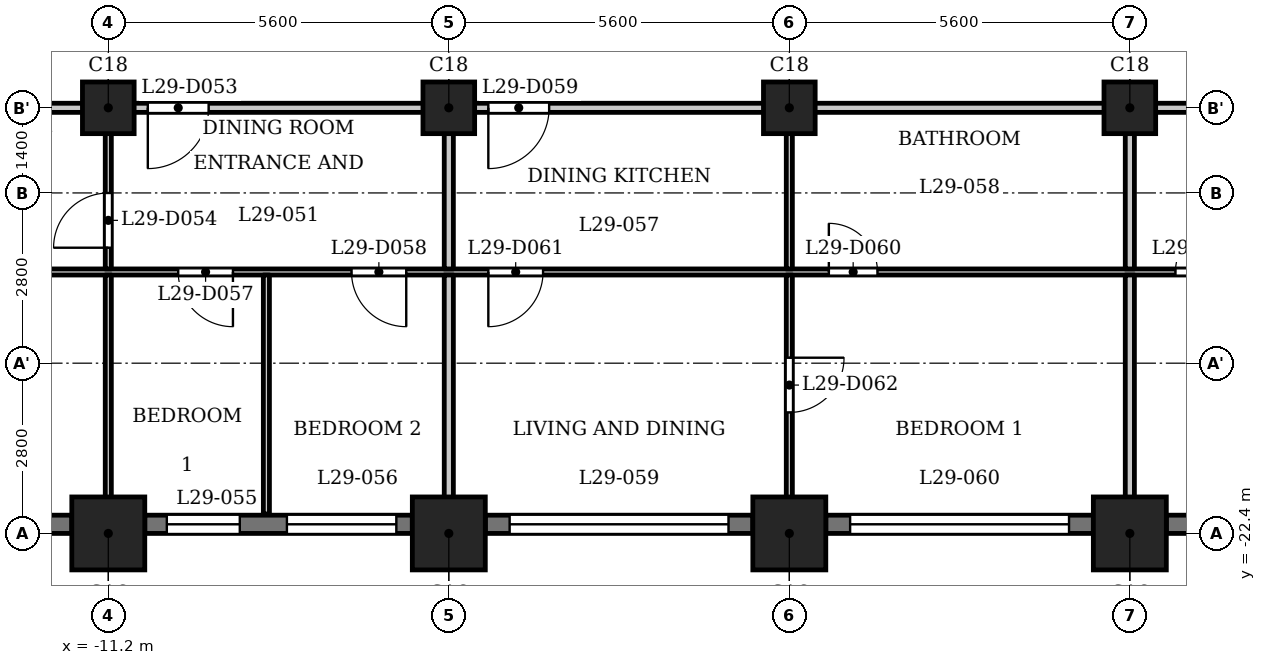
"""IFC4 building model, lengths in metres.
Left out: names, types, materials, properties, quantities, classifications, styles, units other than length and angle.
Written with IfcOpenShell. Run it as: python <this file> out.ifc"""

import sys

from ifc_helpers import new_model, si_unit, direction, frame, frame_2d, origin, origin_2d, place, context, subcontext, project, spatial, rectangle, extrude, element, fill, save


model = new_model("IFC4")
c1 = context("Model", 3, precision=1e-05, world=origin(), true_north=direction((0.0, 1.0)))
c2 = subcontext(c1, "Body", "Model", "MODEL_VIEW")
j1 = project(units=[si_unit("LENGTHUNIT", "METRE"), si_unit("PLANEANGLEUNIT", "RADIAN")], contexts=[c1])
p1 = place(None, origin())
s1 = spatial("IfcSite", under=j1, at=p1, CompositionType="ELEMENT")
p2 = place(p1, origin())
s2 = spatial("IfcBuilding", under=s1, at=p2, CompositionType="ELEMENT")
p3 = place(p2, frame((0.0, 0.0, 114.8)))
s3 = spatial("IfcBuildingStorey", under=s2, at=p3, CompositionType="ELEMENT", Elevation=114.8)
for number, where, z_axis, x_axis in (
    (1, (-11.2, -22.4, 0.0), (0.0, 0.0, 1.0), (1.0, 0.0, 0.0)),
    (2, (-5.6, -22.4, 0.0), (0.0, 0.0, 1.0), (1.0, 0.0, 0.0)),
    (3, (0.0, -22.4, 0.0), (0.0, 0.0, 1.0), (1.0, 0.0, 0.0)),
    (4, (5.6, -22.4, 0.0), (0.0, 0.0, 1.0), (1.0, 0.0, 0.0)),
):
    element("IfcColumn", number, at=place(p3, frame(where, z_axis=z_axis, x_axis=x_axis)), inside=s3, PredefinedType="COLUMN", context=c2, shape_type="SweptSolid", body=[
        extrude(rectangle(XDim=1.2, YDim=1.2, at=origin_2d()), origin(), (0.0, 0.0, 1.0), 3.5),
    ])
for number, where, z_axis, x_axis in (
    (5, (-11.2, -15.4, 0.0), (0.0, 0.0, 1.0), (1.0, 0.0, 0.0)),
    (6, (-5.6, -15.4, 0.0), (0.0, 0.0, 1.0), (1.0, 0.0, 0.0)),
    (7, (0.0, -15.4, 0.0), (0.0, 0.0, 1.0), (1.0, 0.0, 0.0)),
    (8, (5.6, -15.4, 0.0), (0.0, 0.0, 1.0), (1.0, 0.0, 0.0)),
):
    element("IfcColumn", number, at=place(p3, frame(where, z_axis=z_axis, x_axis=x_axis)), inside=s3, PredefinedType="COLUMN", context=c2, shape_type="SweptSolid", body=[
        extrude(rectangle(XDim=0.85, YDim=0.85, at=origin_2d()), origin(), (0.0, 0.0, 1.0), 3.5),
    ])
p4 = place(p3, frame((-16.2, -22.25, 0.0), z_axis=(0.0, 0.0, 1.0), x_axis=(1.0, 0.0, 0.0)))
e9 = element("IfcWall", 9, at=p4, inside=s3, PredefinedType="SOLIDWALL", context=c2, shape_type="SweptSolid", body=[
    extrude(rectangle(XDim=4.4, YDim=0.3, at=frame_2d((2.2, 0.0))), origin(), (0.0, 0.0, 1.0), 2.4),
])
p5 = place(p4, frame((0.4, 0.0, 1.2)))
e10 = element("IfcOpeningElement", 10, at=p5, cuts=e9, PredefinedType="OPENING", context=c2, shape_type="SweptSolid", body=[
    extrude(rectangle(XDim=3.6, YDim=0.95, at=frame_2d((1.8, 0.475))), frame((0.0, 0.16, 0.0), z_axis=(0.0, -1.0, 0.0), x_axis=(1.0, 0.0, 0.0)), (0.0, 0.0, 1.0), 0.32),
])
p6 = place(p3, frame((-10.6, -22.25, 0.0), z_axis=(0.0, 0.0, 1.0), x_axis=(1.0, 0.0, 0.0)))
e11 = element("IfcWall", 11, at=p6, inside=s3, PredefinedType="SOLIDWALL", context=c2, shape_type="SweptSolid", body=[
    extrude(rectangle(XDim=4.4, YDim=0.3, at=frame_2d((2.2, 0.0))), origin(), (0.0, 0.0, 1.0), 2.4),
])
p7 = place(p6, frame((0.363, 0.0, 0.6)))
e12 = element("IfcOpeningElement", 12, at=p7, cuts=e11, PredefinedType="OPENING", context=c2, shape_type="SweptSolid", body=[
    extrude(rectangle(XDim=1.2, YDim=1.55, at=frame_2d((0.6, 0.775))), frame((0.0, 0.16, 0.0), z_axis=(0.0, -1.0, 0.0), x_axis=(1.0, 0.0, 0.0)), (0.0, 0.0, 1.0), 0.32),
])
p8 = place(p6, frame((2.337, 0.0, 0.9)))
e13 = element("IfcOpeningElement", 13, at=p8, cuts=e11, PredefinedType="OPENING", context=c2, shape_type="SweptSolid", body=[
    extrude(rectangle(XDim=1.8, YDim=1.25, at=frame_2d((0.9, 0.625))), frame((0.0, 0.16, 0.0), z_axis=(0.0, -1.0, 0.0), x_axis=(1.0, 0.0, 0.0)), (0.0, 0.0, 1.0), 0.32),
])
p9 = place(p3, frame((-5.0, -22.25, 0.0), z_axis=(0.0, 0.0, 1.0), x_axis=(1.0, 0.0, 0.0)))
e14 = element("IfcWall", 14, at=p9, inside=s3, PredefinedType="SOLIDWALL", context=c2, shape_type="SweptSolid", body=[
    extrude(rectangle(XDim=4.4, YDim=0.3, at=frame_2d((2.2, 0.0))), origin(), (0.0, 0.0, 1.0), 2.4),
])
p10 = place(p9, frame((0.4, 0.0, 1.2)))
e15 = element("IfcOpeningElement", 15, at=p10, cuts=e14, PredefinedType="OPENING", context=c2, shape_type="SweptSolid", body=[
    extrude(rectangle(XDim=3.6, YDim=0.95, at=frame_2d((1.8, 0.475))), frame((0.0, 0.16, 0.0), z_axis=(0.0, -1.0, 0.0), x_axis=(1.0, 0.0, 0.0)), (0.0, 0.0, 1.0), 0.32),
])
p11 = place(p3, frame((0.6, -22.25, 0.0), z_axis=(0.0, 0.0, 1.0), x_axis=(1.0, 0.0, 0.0)))
e16 = element("IfcWall", 16, at=p11, inside=s3, PredefinedType="SOLIDWALL", context=c2, shape_type="SweptSolid", body=[
    extrude(rectangle(XDim=4.4, YDim=0.3, at=frame_2d((2.2, 0.0))), origin(), (0.0, 0.0, 1.0), 2.4),
])
p12 = place(p11, frame((0.4, 0.0, 1.2)))
e17 = element("IfcOpeningElement", 17, at=p12, cuts=e16, PredefinedType="OPENING", context=c2, shape_type="SweptSolid", body=[
    extrude(rectangle(XDim=3.6, YDim=0.95, at=frame_2d((1.8, 0.475))), frame((0.0, 0.16, 0.0), z_axis=(0.0, -1.0, 0.0), x_axis=(1.0, 0.0, 0.0)), (0.0, 0.0, 1.0), 0.32),
])
p13 = place(p3, frame((6.2, -22.25, 0.0), z_axis=(0.0, 0.0, 1.0), x_axis=(1.0, 0.0, 0.0)))
e18 = element("IfcWall", 18, at=p13, inside=s3, PredefinedType="SOLIDWALL", context=c2, shape_type="SweptSolid", body=[
    extrude(rectangle(XDim=4.4, YDim=0.3, at=frame_2d((2.2, 0.0))), origin(), (0.0, 0.0, 1.0), 2.4),
])
p14 = place(p13, frame((0.4, 0.0, 1.2)))
e19 = element("IfcOpeningElement", 19, at=p14, cuts=e18, PredefinedType="OPENING", context=c2, shape_type="SweptSolid", body=[
    extrude(rectangle(XDim=3.6, YDim=0.95, at=frame_2d((1.8, 0.475))), frame((0.0, 0.16, 0.0), z_axis=(0.0, -1.0, 0.0), x_axis=(1.0, 0.0, 0.0)), (0.0, 0.0, 1.0), 0.32),
])
p15 = place(p3, frame((-26.19, -18.1, 0.0), z_axis=(0.0, 0.0, 1.0), x_axis=(1.0, 0.0, 0.0)))
e20 = element("IfcWall", 20, at=p15, inside=s3, PredefinedType="PARTITIONING", context=c2, shape_type="SweptSolid", body=[
    extrude(rectangle(XDim=52.63, YDim=0.1, at=frame_2d((26.315, 0.0))), origin(), (0.0, 0.0, 1.0), 3.2),
])
p16 = place(p15, frame((1.09, 0.0, 0.0)))
e21 = element("IfcOpeningElement", 21, at=p16, cuts=e20, PredefinedType="OPENING", context=c2, shape_type="SweptSolid", body=[
    extrude(rectangle(XDim=0.8, YDim=2.1, at=frame_2d((0.4, 1.05))), frame((0.0, 0.06, 0.0), z_axis=(0.0, -1.0, 0.0), x_axis=(1.0, 0.0, 0.0)), (0.0, 0.0, 1.0), 0.12),
])
p17 = place(p15, frame((4.44, 0.0, 0.0)))
e22 = element("IfcOpeningElement", 22, at=p17, cuts=e20, PredefinedType="OPENING", context=c2, shape_type="SweptSolid", body=[
    extrude(rectangle(XDim=0.9, YDim=2.1, at=frame_2d((0.45, 1.05))), frame((0.0, 0.06, 0.0), z_axis=(0.0, -1.0, 0.0), x_axis=(1.0, 0.0, 0.0)), (0.0, 0.0, 1.0), 0.12),
])
p18 = place(p15, frame((10.14, 0.0, 0.0)))
e23 = element("IfcOpeningElement", 23, at=p18, cuts=e20, PredefinedType="OPENING", context=c2, shape_type="SweptSolid", body=[
    extrude(rectangle(XDim=0.8, YDim=2.1, at=frame_2d((0.4, 1.05))), frame((0.0, 0.06, 0.0), z_axis=(0.0, -1.0, 0.0), x_axis=(1.0, 0.0, 0.0)), (0.0, 0.0, 1.0), 0.12),
])
p19 = place(p15, frame((12.74, 0.0, 0.0)))
e24 = element("IfcOpeningElement", 24, at=p19, cuts=e20, PredefinedType="OPENING", context=c2, shape_type="SweptSolid", body=[
    extrude(rectangle(XDim=0.9, YDim=2.1, at=frame_2d((0.45, 1.05))), frame((0.0, 0.06, 0.0), z_axis=(0.0, -1.0, 0.0), x_axis=(1.0, 0.0, 0.0)), (0.0, 0.0, 1.0), 0.12),
])
p20 = place(p15, frame((16.14, 0.0, 0.0)))
e25 = element("IfcOpeningElement", 25, at=p20, cuts=e20, PredefinedType="OPENING", context=c2, shape_type="SweptSolid", body=[
    extrude(rectangle(XDim=0.9, YDim=2.1, at=frame_2d((0.45, 1.05))), frame((0.0, 0.06, 0.0), z_axis=(0.0, -1.0, 0.0), x_axis=(1.0, 0.0, 0.0)), (0.0, 0.0, 1.0), 0.12),
])
p21 = place(p15, frame((18.99, 0.0, 0.0)))
e26 = element("IfcOpeningElement", 26, at=p21, cuts=e20, PredefinedType="OPENING", context=c2, shape_type="SweptSolid", body=[
    extrude(rectangle(XDim=0.9, YDim=2.1, at=frame_2d((0.45, 1.05))), frame((0.0, 0.06, 0.0), z_axis=(0.0, -1.0, 0.0), x_axis=(1.0, 0.0, 0.0)), (0.0, 0.0, 1.0), 0.12),
])
p22 = place(p15, frame((26.84, 0.0, 0.0)))
e27 = element("IfcOpeningElement", 27, at=p22, cuts=e20, PredefinedType="OPENING", context=c2, shape_type="SweptSolid", body=[
    extrude(rectangle(XDim=0.8, YDim=2.1, at=frame_2d((0.4, 1.05))), frame((0.0, 0.06, 0.0), z_axis=(0.0, -1.0, 0.0), x_axis=(1.0, 0.0, 0.0)), (0.0, 0.0, 1.0), 0.12),
])
p23 = place(p15, frame((21.24, 0.0, 0.0)))
e28 = element("IfcOpeningElement", 28, at=p23, cuts=e20, PredefinedType="OPENING", context=c2, shape_type="SweptSolid", body=[
    extrude(rectangle(XDim=0.9, YDim=2.1, at=frame_2d((0.45, 1.05))), frame((0.0, 0.06, 0.0), z_axis=(0.0, -1.0, 0.0), x_axis=(1.0, 0.0, 0.0)), (0.0, 0.0, 1.0), 0.12),
])
p24 = place(p15, frame((32.54, 0.0, 0.0)))
e29 = element("IfcOpeningElement", 29, at=p24, cuts=e20, PredefinedType="OPENING", context=c2, shape_type="SweptSolid", body=[
    extrude(rectangle(XDim=0.8, YDim=2.1, at=frame_2d((0.4, 1.05))), frame((0.0, 0.06, 0.0), z_axis=(0.0, -1.0, 0.0), x_axis=(1.0, 0.0, 0.0)), (0.0, 0.0, 1.0), 0.12),
])
p25 = place(p15, frame((35.14, 0.0, 0.0)))
e30 = element("IfcOpeningElement", 30, at=p25, cuts=e20, PredefinedType="OPENING", context=c2, shape_type="SweptSolid", body=[
    extrude(rectangle(XDim=0.9, YDim=2.1, at=frame_2d((0.45, 1.05))), frame((0.0, 0.06, 0.0), z_axis=(0.0, -1.0, 0.0), x_axis=(1.0, 0.0, 0.0)), (0.0, 0.0, 1.0), 0.12),
])
p26 = place(p15, frame((38.54, 0.0, 0.0)))
e31 = element("IfcOpeningElement", 31, at=p26, cuts=e20, PredefinedType="OPENING", context=c2, shape_type="SweptSolid", body=[
    extrude(rectangle(XDim=0.9, YDim=2.1, at=frame_2d((0.45, 1.05))), frame((0.0, 0.06, 0.0), z_axis=(0.0, -1.0, 0.0), x_axis=(1.0, 0.0, 0.0)), (0.0, 0.0, 1.0), 0.12),
])
p27 = place(p15, frame((41.39, 0.0, 0.0)))
e32 = element("IfcOpeningElement", 32, at=p27, cuts=e20, PredefinedType="OPENING", context=c2, shape_type="SweptSolid", body=[
    extrude(rectangle(XDim=0.9, YDim=2.1, at=frame_2d((0.45, 1.05))), frame((0.0, 0.06, 0.0), z_axis=(0.0, -1.0, 0.0), x_axis=(1.0, 0.0, 0.0)), (0.0, 0.0, 1.0), 0.12),
])
p28 = place(p15, frame((49.204, 0.0, 0.0)))
e33 = element("IfcOpeningElement", 33, at=p28, cuts=e20, PredefinedType="OPENING", context=c2, shape_type="SweptSolid", body=[
    extrude(rectangle(XDim=0.8, YDim=2.1, at=frame_2d((0.4, 1.05))), frame((0.0, 0.06, 0.0), z_axis=(0.0, -1.0, 0.0), x_axis=(1.0, 0.0, 0.0)), (0.0, 0.0, 1.0), 0.12),
])
p29 = place(p15, frame((43.64, 0.0, 0.0)))
e34 = element("IfcOpeningElement", 34, at=p29, cuts=e20, PredefinedType="OPENING", context=c2, shape_type="SweptSolid", body=[
    extrude(rectangle(XDim=0.9, YDim=2.1, at=frame_2d((0.45, 1.05))), frame((0.0, 0.06, 0.0), z_axis=(0.0, -1.0, 0.0), x_axis=(1.0, 0.0, 0.0)), (0.0, 0.0, 1.0), 0.12),
])
p30 = place(p3, frame((-27.484, -15.4, 0.0), z_axis=(0.0, 0.0, 1.0), x_axis=(1.0, 0.0, 0.0)))
e35 = element("IfcWall", 35, at=p30, inside=s3, PredefinedType="PARTITIONING", context=c2, shape_type="SweptSolid", body=[
    extrude(rectangle(XDim=54.968, YDim=0.15, at=frame_2d((27.484, 0.0))), origin(), (0.0, 0.0, 1.0), 3.2),
])
p31 = place(p30, frame((5.734, 0.0, 0.0)))
e36 = element("IfcOpeningElement", 36, at=p31, cuts=e35, PredefinedType="OPENING", context=c2, shape_type="SweptSolid", body=[
    extrude(rectangle(XDim=1.0, YDim=2.1, at=frame_2d((0.5, 1.05))), frame((0.0, 0.085, 0.0), z_axis=(0.0, -1.0, 0.0), x_axis=(1.0, 0.0, 0.0)), (0.0, 0.0, 1.0), 0.17),
])
p32 = place(p30, frame((16.934, 0.0, 0.0)))
e37 = element("IfcOpeningElement", 37, at=p32, cuts=e35, PredefinedType="OPENING", context=c2, shape_type="SweptSolid", body=[
    extrude(rectangle(XDim=1.0, YDim=2.1, at=frame_2d((0.5, 1.05))), frame((0.0, 0.085, 0.0), z_axis=(0.0, -1.0, 0.0), x_axis=(1.0, 0.0, 0.0)), (0.0, 0.0, 1.0), 0.17),
])
p33 = place(p30, frame((22.534, 0.0, 0.0)))
e38 = element("IfcOpeningElement", 38, at=p33, cuts=e35, PredefinedType="OPENING", context=c2, shape_type="SweptSolid", body=[
    extrude(rectangle(XDim=1.0, YDim=2.1, at=frame_2d((0.5, 1.05))), frame((0.0, 0.085, 0.0), z_axis=(0.0, -1.0, 0.0), x_axis=(1.0, 0.0, 0.0)), (0.0, 0.0, 1.0), 0.17),
])
p34 = place(p30, frame((39.334, 0.0, 0.0)))
e39 = element("IfcOpeningElement", 39, at=p34, cuts=e35, PredefinedType="OPENING", context=c2, shape_type="SweptSolid", body=[
    extrude(rectangle(XDim=1.0, YDim=2.1, at=frame_2d((0.5, 1.05))), frame((0.0, 0.085, 0.0), z_axis=(0.0, -1.0, 0.0), x_axis=(1.0, 0.0, 0.0)), (0.0, 0.0, 1.0), 0.17),
])
p35 = place(p30, frame((44.934, 0.0, 0.0)))
e40 = element("IfcOpeningElement", 40, at=p35, cuts=e35, PredefinedType="OPENING", context=c2, shape_type="SweptSolid", body=[
    extrude(rectangle(XDim=1.0, YDim=2.1, at=frame_2d((0.5, 1.05))), frame((0.0, 0.085, 0.0), z_axis=(0.0, -1.0, 0.0), x_axis=(1.0, 0.0, 0.0)), (0.0, 0.0, 1.0), 0.17),
])
p36 = place(p3, frame((-11.2, -22.98, 0.0), z_axis=(0.0, 0.0, 1.0), x_axis=(0.0, 1.0, 0.0)))
e41 = element("IfcWall", 41, at=p36, inside=s3, PredefinedType="PARTITIONING", context=c2, shape_type="SweptSolid", body=[
    extrude(rectangle(XDim=4.83, YDim=0.1, at=frame_2d((2.415, 0.0))), origin(), (0.0, 0.0, 1.0), 3.2),
])
p37 = place(p3, frame((-11.2, -18.05, 0.0), z_axis=(0.0, 0.0, 1.0), x_axis=(0.0, 1.0, 0.0)))
e42 = element("IfcWall", 42, at=p37, inside=s3, PredefinedType="PARTITIONING", context=c2, shape_type="SweptSolid", body=[
    extrude(rectangle(XDim=2.575, YDim=0.1, at=frame_2d((1.288, 0.0))), origin(), (0.0, 0.0, 1.0), 3.2),
])
p38 = place(p37, frame((0.349, 0.0, 0.0)))
e43 = element("IfcOpeningElement", 43, at=p38, cuts=e42, PredefinedType="OPENING", context=c2, shape_type="SweptSolid", body=[
    extrude(rectangle(XDim=0.9, YDim=2.1, at=frame_2d((0.45, 1.05))), frame((0.0, 0.06, 0.0), z_axis=(0.0, -1.0, 0.0), x_axis=(1.0, 0.0, 0.0)), (0.0, 0.0, 1.0), 0.12),
])
p39 = place(p3, frame((-8.6, -22.08, 0.0), z_axis=(0.0, 0.0, 1.0), x_axis=(0.0, 1.0, 0.0)))
e44 = element("IfcWall", 44, at=p39, inside=s3, PredefinedType="PARTITIONING", context=c2, shape_type="SweptSolid", body=[
    extrude(rectangle(XDim=3.93, YDim=0.1, at=frame_2d((1.965, 0.0))), origin(), (0.0, 0.0, 1.0), 3.2),
])
p40 = place(p3, frame((-5.6, -22.98, 0.0), z_axis=(0.0, 0.0, 1.0), x_axis=(0.0, 1.0, 0.0)))
e45 = element("IfcWall", 45, at=p40, inside=s3, PredefinedType="PARTITIONING", context=c2, shape_type="SweptSolid", body=[
    extrude(rectangle(XDim=4.83, YDim=0.15, at=frame_2d((2.415, 0.0))), origin(), (0.0, 0.0, 1.0), 3.2),
])
p41 = place(p3, frame((-5.6, -18.05, 0.0), z_axis=(0.0, 0.0, 1.0), x_axis=(0.0, 1.0, 0.0)))
e46 = element("IfcWall", 46, at=p41, inside=s3, PredefinedType="PARTITIONING", context=c2, shape_type="SweptSolid", body=[
    extrude(rectangle(XDim=2.575, YDim=0.15, at=frame_2d((1.288, 0.0))), origin(), (0.0, 0.0, 1.0), 3.2),
])
p42 = place(p3, frame((0.0, -22.98, 0.0), z_axis=(0.0, 0.0, 1.0), x_axis=(0.0, 1.0, 0.0)))
e47 = element("IfcWall", 47, at=p42, inside=s3, PredefinedType="PARTITIONING", context=c2, shape_type="SweptSolid", body=[
    extrude(rectangle(XDim=4.83, YDim=0.1, at=frame_2d((2.415, 0.0))), origin(), (0.0, 0.0, 1.0), 3.2),
])
p43 = place(p42, frame((2.57, 0.0, 0.0)))
e48 = element("IfcOpeningElement", 48, at=p43, cuts=e47, PredefinedType="OPENING", context=c2, shape_type="SweptSolid", body=[
    extrude(rectangle(XDim=0.9, YDim=2.1, at=frame_2d((0.45, 1.05))), frame((0.0, 0.06, 0.0), z_axis=(0.0, -1.0, 0.0), x_axis=(1.0, 0.0, 0.0)), (0.0, 0.0, 1.0), 0.12),
])
p44 = place(p3, frame((0.0, -18.05, 0.0), z_axis=(0.0, 0.0, 1.0), x_axis=(0.0, 1.0, 0.0)))
e49 = element("IfcWall", 49, at=p44, inside=s3, PredefinedType="PARTITIONING", context=c2, shape_type="SweptSolid", body=[
    extrude(rectangle(XDim=2.575, YDim=0.1, at=frame_2d((1.288, 0.0))), origin(), (0.0, 0.0, 1.0), 3.2),
])
p45 = place(p3, frame((5.6, -22.98, 0.0), z_axis=(0.0, 0.0, 1.0), x_axis=(0.0, 1.0, 0.0)))
e50 = element("IfcWall", 50, at=p45, inside=s3, PredefinedType="PARTITIONING", context=c2, shape_type="SweptSolid", body=[
    extrude(rectangle(XDim=4.83, YDim=0.15, at=frame_2d((2.415, 0.0))), origin(), (0.0, 0.0, 1.0), 3.2),
])
p46 = place(p3, frame((5.6, -18.05, 0.0), z_axis=(0.0, 0.0, 1.0), x_axis=(0.0, 1.0, 0.0)))
e51 = element("IfcWall", 51, at=p46, inside=s3, PredefinedType="PARTITIONING", context=c2, shape_type="SweptSolid", body=[
    extrude(rectangle(XDim=2.575, YDim=0.15, at=frame_2d((1.288, 0.0))), origin(), (0.0, 0.0, 1.0), 3.2),
])
p47 = place(p32, origin())
e52 = element("IfcDoor", 52, at=p47, inside=s3, OperationType="SINGLE_SWING_LEFT", PredefinedType="DOOR", context=c2, shape_type="SweptSolid", body=[
    extrude(rectangle(XDim=1.0, YDim=2.1, at=frame_2d((0.5, 1.05))), frame((0.0, 0.025, 0.0), z_axis=(0.0, -1.0, 0.0), x_axis=(1.0, 0.0, 0.0)), (0.0, 0.0, 1.0), 0.05),
])
fill(e37, e52)
p48 = place(p38, origin())
e53 = element("IfcDoor", 53, at=p48, inside=s3, OperationType="SINGLE_SWING_RIGHT", PredefinedType="DOOR", context=c2, shape_type="SweptSolid", body=[
    extrude(rectangle(XDim=0.9, YDim=2.1, at=frame_2d((0.45, 1.05))), frame((0.0, 0.025, 0.0), z_axis=(0.0, -1.0, 0.0), x_axis=(1.0, 0.0, 0.0)), (0.0, 0.0, 1.0), 0.05),
])
fill(e43, e53)
p49 = place(p20, origin())
e54 = element("IfcDoor", 54, at=p49, inside=s3, OperationType="SINGLE_SWING_RIGHT", PredefinedType="DOOR", context=c2, shape_type="SweptSolid", body=[
    extrude(rectangle(XDim=0.9, YDim=2.1, at=frame_2d((0.45, 1.05))), frame((0.0, 0.025, 0.0), z_axis=(0.0, -1.0, 0.0), x_axis=(1.0, 0.0, 0.0)), (0.0, 0.0, 1.0), 0.05),
])
fill(e25, e54)
p50 = place(p21, origin())
e55 = element("IfcDoor", 55, at=p50, inside=s3, OperationType="SINGLE_SWING_RIGHT", PredefinedType="DOOR", context=c2, shape_type="SweptSolid", body=[
    extrude(rectangle(XDim=0.9, YDim=2.1, at=frame_2d((0.45, 1.05))), frame((0.0, 0.025, 0.0), z_axis=(0.0, -1.0, 0.0), x_axis=(1.0, 0.0, 0.0)), (0.0, 0.0, 1.0), 0.05),
])
fill(e26, e55)
p51 = place(p33, origin())
e56 = element("IfcDoor", 56, at=p51, inside=s3, OperationType="SINGLE_SWING_LEFT", PredefinedType="DOOR", context=c2, shape_type="SweptSolid", body=[
    extrude(rectangle(XDim=1.0, YDim=2.1, at=frame_2d((0.5, 1.05))), frame((0.0, 0.025, 0.0), z_axis=(0.0, -1.0, 0.0), x_axis=(1.0, 0.0, 0.0)), (0.0, 0.0, 1.0), 0.05),
])
fill(e38, e56)
p52 = place(p22, origin())
e57 = element("IfcDoor", 57, at=p52, inside=s3, OperationType="SINGLE_SWING_RIGHT", PredefinedType="DOOR", context=c2, shape_type="SweptSolid", body=[
    extrude(rectangle(XDim=0.8, YDim=2.1, at=frame_2d((0.4, 1.05))), frame((0.0, 0.025, 0.0), z_axis=(0.0, -1.0, 0.0), x_axis=(1.0, 0.0, 0.0)), (0.0, 0.0, 1.0), 0.05),
])
fill(e27, e57)
p53 = place(p23, origin())
e58 = element("IfcDoor", 58, at=p53, inside=s3, OperationType="SINGLE_SWING_LEFT", PredefinedType="DOOR", context=c2, shape_type="SweptSolid", body=[
    extrude(rectangle(XDim=0.9, YDim=2.1, at=frame_2d((0.45, 1.05))), frame((0.0, 0.025, 0.0), z_axis=(0.0, -1.0, 0.0), x_axis=(1.0, 0.0, 0.0)), (0.0, 0.0, 1.0), 0.05),
])
fill(e28, e58)
p54 = place(p43, origin())
e59 = element("IfcDoor", 59, at=p54, inside=s3, OperationType="SINGLE_SWING_RIGHT", PredefinedType="DOOR", context=c2, shape_type="SweptSolid", body=[
    extrude(rectangle(XDim=0.9, YDim=2.1, at=frame_2d((0.45, 1.05))), frame((0.0, 0.025, 0.0), z_axis=(0.0, -1.0, 0.0), x_axis=(1.0, 0.0, 0.0)), (0.0, 0.0, 1.0), 0.05),
])
fill(e48, e59)
p55 = place(p24, origin())
e60 = element("IfcDoor", 60, at=p55, inside=s3, OperationType="SINGLE_SWING_LEFT", PredefinedType="DOOR", context=c2, shape_type="SweptSolid", body=[
    extrude(rectangle(XDim=0.8, YDim=2.1, at=frame_2d((0.4, 1.05))), frame((0.0, 0.025, 0.0), z_axis=(0.0, -1.0, 0.0), x_axis=(1.0, 0.0, 0.0)), (0.0, 0.0, 1.0), 0.05),
])
fill(e29, e60)
p56 = place(p7, origin())
e61 = element("IfcWindow", 61, at=p56, inside=s3, PartitioningType="SINGLE_PANEL", PredefinedType="WINDOW", context=c2, shape_type="SweptSolid", body=[
    extrude(rectangle(XDim=1.2, YDim=1.55, at=frame_2d((0.6, 0.775))), frame((0.0, 0.03, 0.0), z_axis=(0.0, -1.0, 0.0), x_axis=(1.0, 0.0, 0.0)), (0.0, 0.0, 1.0), 0.06),
])
fill(e12, e61)
p57 = place(p8, origin())
e62 = element("IfcWindow", 62, at=p57, inside=s3, PartitioningType="SINGLE_PANEL", PredefinedType="WINDOW", context=c2, shape_type="SweptSolid", body=[
    extrude(rectangle(XDim=1.8, YDim=1.25, at=frame_2d((0.9, 0.625))), frame((0.0, 0.03, 0.0), z_axis=(0.0, -1.0, 0.0), x_axis=(1.0, 0.0, 0.0)), (0.0, 0.0, 1.0), 0.06),
])
fill(e13, e62)
p58 = place(p10, origin())
e63 = element("IfcWindow", 63, at=p58, inside=s3, PartitioningType="SINGLE_PANEL", PredefinedType="WINDOW", context=c2, shape_type="SweptSolid", body=[
    extrude(rectangle(XDim=3.6, YDim=0.95, at=frame_2d((1.8, 0.475))), frame((0.0, 0.03, 0.0), z_axis=(0.0, -1.0, 0.0), x_axis=(1.0, 0.0, 0.0)), (0.0, 0.0, 1.0), 0.06),
])
fill(e15, e63)
p59 = place(p12, origin())
e64 = element("IfcWindow", 64, at=p59, inside=s3, PartitioningType="SINGLE_PANEL", PredefinedType="WINDOW", context=c2, shape_type="SweptSolid", body=[
    extrude(rectangle(XDim=3.6, YDim=0.95, at=frame_2d((1.8, 0.475))), frame((0.0, 0.03, 0.0), z_axis=(0.0, -1.0, 0.0), x_axis=(1.0, 0.0, 0.0)), (0.0, 0.0, 1.0), 0.06),
])
fill(e17, e64)
save(model, sys.argv[1])
